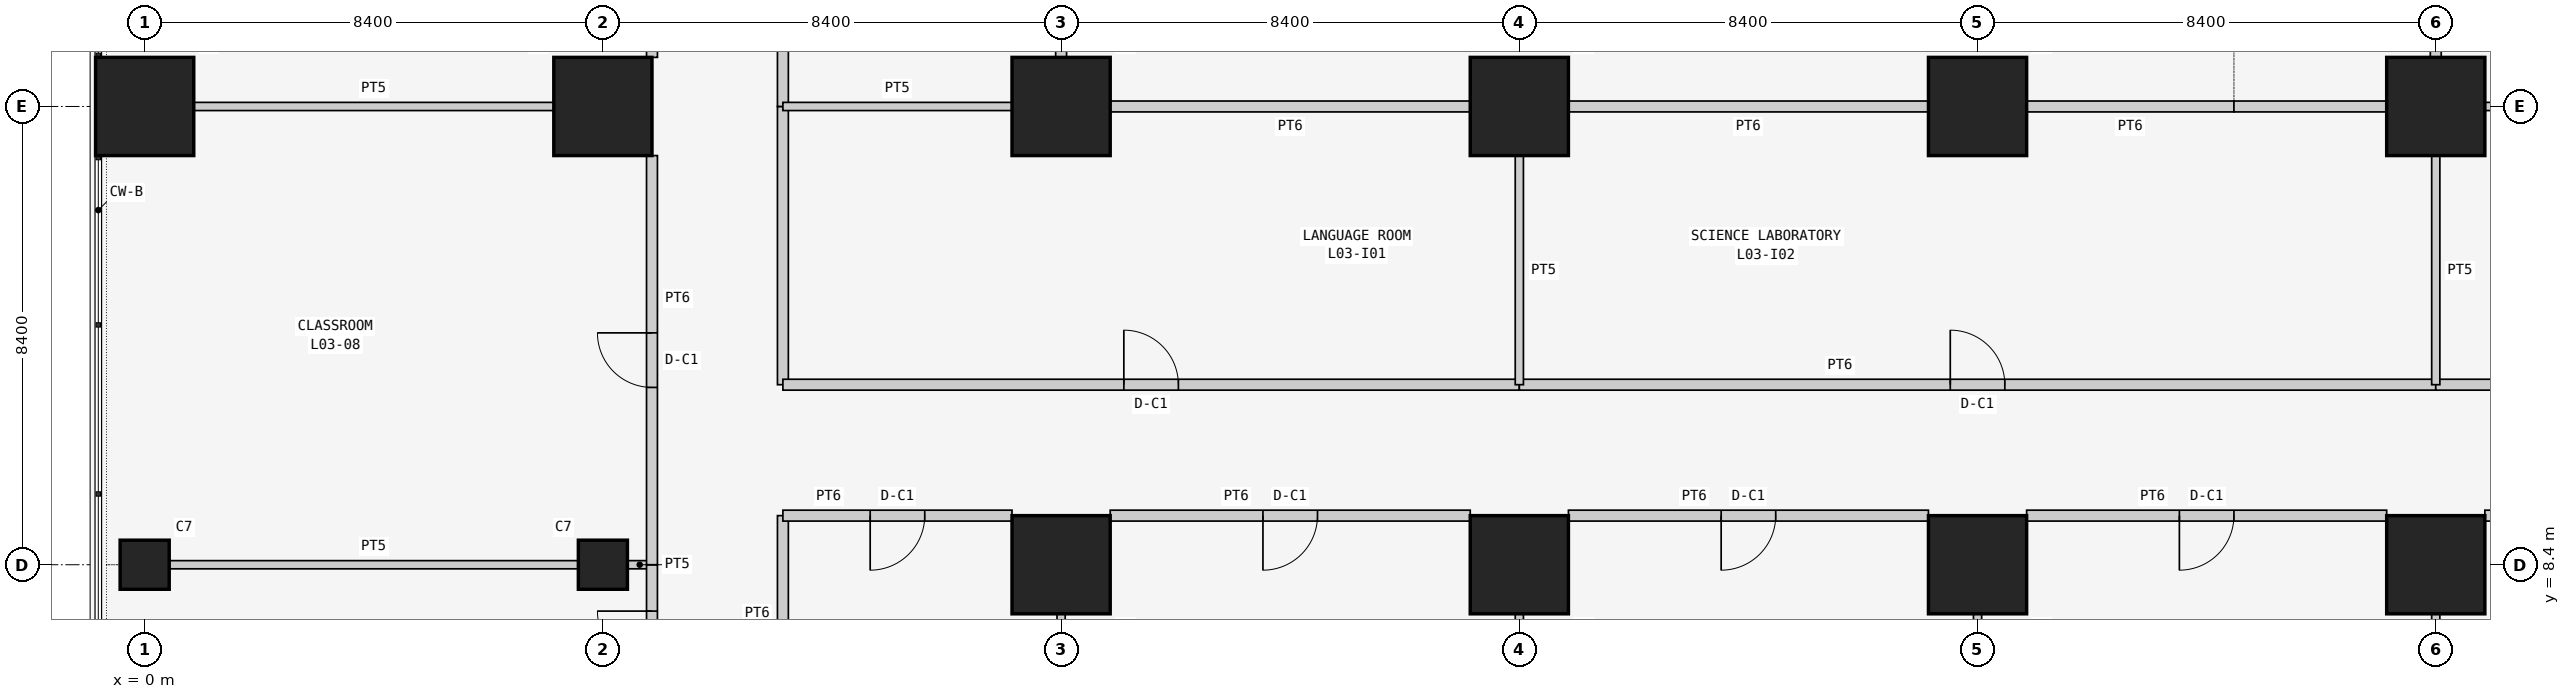
"""IFC4 building model, lengths in metres.
Left out: names, types, materials, properties, quantities, classifications, styles, units other than length and angle.
Written with IfcOpenShell. Run it as: python <this file> out.ifc"""

import sys

from ifc_helpers import new_model, si_unit, direction, frame, frame_2d, origin, origin_2d, place, context, subcontext, project, spatial, rectangle, extrude, element, fill, save


model = new_model("IFC4")
c1 = context("Model", 3, precision=1e-05, world=origin(), true_north=direction((0.0, 1.0)))
c2 = subcontext(c1, "Body", "Model", "MODEL_VIEW")
j1 = project(units=[si_unit("LENGTHUNIT", "METRE"), si_unit("PLANEANGLEUNIT", "RADIAN")], contexts=[c1])
p1 = place(None, origin())
s1 = spatial("IfcSite", under=j1, at=p1, CompositionType="ELEMENT")
p2 = place(p1, origin())
s2 = spatial("IfcBuilding", under=s1, at=p2, CompositionType="ELEMENT")
p3 = place(p2, frame((0.0, 0.0, 15.0)))
s3 = spatial("IfcBuildingStorey", under=s2, at=p3, CompositionType="ELEMENT", Elevation=15.0)
p4 = place(p3, frame((0.0, 8.4, 0.0), z_axis=(0.0, 0.0, 1.0), x_axis=(1.0, 0.0, 0.0)))
e1 = element("IfcColumn", 1, at=p4, inside=s3, PredefinedType="COLUMN", context=c2, shape_type="SweptSolid", body=[
    extrude(rectangle(XDim=0.9, YDim=0.9, at=origin_2d()), origin(), (0.0, 0.0, 1.0), 4.5),
])
p5 = place(p3, frame((0.0, 16.8, 0.0), z_axis=(0.0, 0.0, 1.0), x_axis=(1.0, 0.0, 0.0)))
e2 = element("IfcColumn", 2, at=p5, inside=s3, PredefinedType="COLUMN", context=c2, shape_type="SweptSolid", body=[
    extrude(rectangle(XDim=1.8, YDim=1.8, at=origin_2d()), origin(), (0.0, 0.0, 1.0), 4.5),
])
p6 = place(p3, frame((8.4, 8.4, 0.0), z_axis=(0.0, 0.0, 1.0), x_axis=(1.0, 0.0, 0.0)))
e3 = element("IfcColumn", 3, at=p6, inside=s3, PredefinedType="COLUMN", context=c2, shape_type="SweptSolid", body=[
    extrude(rectangle(XDim=0.9, YDim=0.9, at=origin_2d()), origin(), (0.0, 0.0, 1.0), 4.5),
])
for number, where, z_axis, x_axis in (
    (4, (8.4, 16.8, 0.0), (0.0, 0.0, 1.0), (1.0, 0.0, 0.0)),
    (5, (16.8, 8.4, 0.0), (0.0, 0.0, 1.0), (1.0, 0.0, 0.0)),
    (6, (16.8, 16.8, 0.0), (0.0, 0.0, 1.0), (1.0, 0.0, 0.0)),
    (7, (25.2, 8.4, 0.0), (0.0, 0.0, 1.0), (1.0, 0.0, 0.0)),
    (8, (25.2, 16.8, 0.0), (0.0, 0.0, 1.0), (1.0, 0.0, 0.0)),
    (9, (33.6, 8.4, 0.0), (0.0, 0.0, 1.0), (1.0, 0.0, 0.0)),
    (10, (33.6, 16.8, 0.0), (0.0, 0.0, 1.0), (1.0, 0.0, 0.0)),
    (11, (42.0, 8.4, 0.0), (0.0, 0.0, 1.0), (1.0, 0.0, 0.0)),
    (12, (42.0, 16.8, 0.0), (0.0, 0.0, 1.0), (1.0, 0.0, 0.0)),
):
    element("IfcColumn", number, at=place(p3, frame(where, z_axis=z_axis, x_axis=x_axis)), inside=s3, PredefinedType="COLUMN", context=c2, shape_type="SweptSolid", body=[
        extrude(rectangle(XDim=1.8, YDim=1.8, at=origin_2d()), origin(), (0.0, 0.0, 1.0), 4.5),
    ])
p7 = place(p3, frame((16.8, 7.5, 0.0), z_axis=(0.0, 0.0, 1.0), x_axis=(0.0, -1.0, 0.0)))
e13 = element("IfcWall", 13, at=p7, inside=s3, PredefinedType="PARTITIONING", context=c2, shape_type="SweptSolid", body=[
    extrude(rectangle(XDim=6.6, YDim=0.15, at=frame_2d((3.3, 0.0))), origin(), (0.0, 0.0, 1.0), 3.543),
])
p8 = place(p3, frame((11.7, 5.7, 0.0), z_axis=(0.0, 0.0, 1.0), x_axis=(0.0, 1.0, 0.0)))
e14 = element("IfcWall", 14, at=p8, inside=s3, PredefinedType="PARTITIONING", context=c2, shape_type="SweptSolid", body=[
    extrude(rectangle(XDim=3.6, YDim=0.2, at=frame_2d((1.8, 0.0))), origin(), (0.0, 0.0, 1.0), 4.3),
])
p9 = place(p3, frame((11.7, 9.3, 0.0), z_axis=(0.0, 0.0, 1.0), x_axis=(1.0, 0.0, 0.0)))
e15 = element("IfcWall", 15, at=p9, inside=s3, PredefinedType="PARTITIONING", context=c2, shape_type="SweptSolid", body=[
    extrude(rectangle(XDim=4.2, YDim=0.2, at=frame_2d((2.1, 0.0))), origin(), (0.0, 0.0, 1.0), 4.3),
])
p10 = place(p9, frame((1.6, 0.0, 0.0)))
e16 = element("IfcOpeningElement", 16, at=p10, cuts=e15, PredefinedType="OPENING", context=c2, shape_type="SweptSolid", body=[
    extrude(rectangle(XDim=1.0, YDim=2.1, at=frame_2d((0.5, 1.05))), frame((0.0, 0.11, 0.0), z_axis=(0.0, -1.0, 0.0), x_axis=(1.0, 0.0, 0.0)), (0.0, 0.0, 1.0), 0.22),
])
p11 = place(p3, frame((42.0, 0.9, 0.0), z_axis=(0.0, 0.0, 1.0), x_axis=(0.0, 1.0, 0.0)))
e17 = element("IfcWall", 17, at=p11, inside=s3, PredefinedType="PARTITIONING", context=c2, shape_type="SweptSolid", body=[
    extrude(rectangle(XDim=6.6, YDim=0.15, at=frame_2d((3.3, 0.0))), origin(), (0.0, 0.0, 1.0), 3.543),
])
p12 = place(p3, frame((42.9, 9.3, 0.0), z_axis=(0.0, 0.0, 1.0), x_axis=(1.0, 0.0, 0.0)))
e18 = element("IfcWall", 18, at=p12, inside=s3, PredefinedType="PARTITIONING", context=c2, shape_type="SweptSolid", body=[
    extrude(rectangle(XDim=4.2, YDim=0.2, at=frame_2d((2.1, 0.0))), origin(), (0.0, 0.0, 1.0), 4.3),
])
p13 = place(p12, frame((1.6, 0.0, 0.0)))
e19 = element("IfcOpeningElement", 19, at=p13, cuts=e18, PredefinedType="OPENING", context=c2, shape_type="SweptSolid", body=[
    extrude(rectangle(XDim=1.0, YDim=2.1, at=frame_2d((0.5, 1.05))), frame((0.0, 0.11, 0.0), z_axis=(0.0, -1.0, 0.0), x_axis=(1.0, 0.0, 0.0)), (0.0, 0.0, 1.0), 0.22),
])
p14 = place(p3, frame((0.45, 8.4, 0.0), z_axis=(0.0, 0.0, 1.0), x_axis=(1.0, 0.0, 0.0)))
e20 = element("IfcWall", 20, at=p14, inside=s3, PredefinedType="PARTITIONING", context=c2, shape_type="SweptSolid", body=[
    extrude(rectangle(XDim=7.5, YDim=0.15, at=frame_2d((3.75, 0.0))), origin(), (0.0, 0.0, 1.0), 3.543),
])
p15 = place(p3, frame((8.85, 8.4, 0.0), z_axis=(0.0, 0.0, 1.0), x_axis=(1.0, 0.0, 0.0)))
e21 = element("IfcWall", 21, at=p15, inside=s3, PredefinedType="PARTITIONING", context=c2, shape_type="SweptSolid", body=[
    extrude(rectangle(XDim=0.45, YDim=0.15, at=frame_2d((0.225, 0.0))), origin(), (0.0, 0.0, 1.0), 3.543),
])
p16 = place(p3, frame((9.3, 8.4, 0.0), z_axis=(0.0, 0.0, 1.0), x_axis=(0.0, -1.0, 0.0)))
e22 = element("IfcWall", 22, at=p16, inside=s3, PredefinedType="PARTITIONING", context=c2, shape_type="SweptSolid", body=[
    extrude(rectangle(XDim=2.7, YDim=0.2, at=frame_2d((1.35, 0.0))), origin(), (0.0, 0.0, 1.0), 4.3),
])
p17 = place(p16, frame((0.85, 0.0, 0.0)))
e23 = element("IfcOpeningElement", 23, at=p17, cuts=e22, PredefinedType="OPENING", context=c2, shape_type="SweptSolid", body=[
    extrude(rectangle(XDim=1.0, YDim=2.1, at=frame_2d((0.5, 1.05))), frame((0.0, 0.11, 0.0), z_axis=(0.0, -1.0, 0.0), x_axis=(1.0, 0.0, 0.0)), (0.0, 0.0, 1.0), 0.22),
])
p18 = place(p3, frame((25.2, 7.5, 0.0), z_axis=(0.0, 0.0, 1.0), x_axis=(0.0, -1.0, 0.0)))
e24 = element("IfcWall", 24, at=p18, inside=s3, PredefinedType="PARTITIONING", context=c2, shape_type="SweptSolid", body=[
    extrude(rectangle(XDim=6.6, YDim=0.15, at=frame_2d((3.3, 0.0))), origin(), (0.0, 0.0, 1.0), 3.543),
])
p19 = place(p3, frame((17.7, 9.3, 0.0), z_axis=(0.0, 0.0, 1.0), x_axis=(1.0, 0.0, 0.0)))
e25 = element("IfcWall", 25, at=p19, inside=s3, PredefinedType="PARTITIONING", context=c2, shape_type="SweptSolid", body=[
    extrude(rectangle(XDim=6.6, YDim=0.2, at=frame_2d((3.3, 0.0))), origin(), (0.0, 0.0, 1.0), 4.3),
])
p20 = place(p19, frame((2.8, 0.0, 0.0)))
e26 = element("IfcOpeningElement", 26, at=p20, cuts=e25, PredefinedType="OPENING", context=c2, shape_type="SweptSolid", body=[
    extrude(rectangle(XDim=1.0, YDim=2.1, at=frame_2d((0.5, 1.05))), frame((0.0, 0.11, 0.0), z_axis=(0.0, -1.0, 0.0), x_axis=(1.0, 0.0, 0.0)), (0.0, 0.0, 1.0), 0.22),
])
p21 = place(p3, frame((33.6, 7.5, 0.0), z_axis=(0.0, 0.0, 1.0), x_axis=(0.0, -1.0, 0.0)))
e27 = element("IfcWall", 27, at=p21, inside=s3, PredefinedType="PARTITIONING", context=c2, shape_type="SweptSolid", body=[
    extrude(rectangle(XDim=6.6, YDim=0.15, at=frame_2d((3.3, 0.0))), origin(), (0.0, 0.0, 1.0), 3.543),
])
p22 = place(p3, frame((26.1, 9.3, 0.0), z_axis=(0.0, 0.0, 1.0), x_axis=(1.0, 0.0, 0.0)))
e28 = element("IfcWall", 28, at=p22, inside=s3, PredefinedType="PARTITIONING", context=c2, shape_type="SweptSolid", body=[
    extrude(rectangle(XDim=6.6, YDim=0.2, at=frame_2d((3.3, 0.0))), origin(), (0.0, 0.0, 1.0), 4.3),
])
p23 = place(p22, frame((2.8, 0.0, 0.0)))
e29 = element("IfcOpeningElement", 29, at=p23, cuts=e28, PredefinedType="OPENING", context=c2, shape_type="SweptSolid", body=[
    extrude(rectangle(XDim=1.0, YDim=2.1, at=frame_2d((0.5, 1.05))), frame((0.0, 0.11, 0.0), z_axis=(0.0, -1.0, 0.0), x_axis=(1.0, 0.0, 0.0)), (0.0, 0.0, 1.0), 0.22),
])
p24 = place(p3, frame((34.5, 9.3, 0.0), z_axis=(0.0, 0.0, 1.0), x_axis=(1.0, 0.0, 0.0)))
e30 = element("IfcWall", 30, at=p24, inside=s3, PredefinedType="PARTITIONING", context=c2, shape_type="SweptSolid", body=[
    extrude(rectangle(XDim=6.6, YDim=0.2, at=frame_2d((3.3, 0.0))), origin(), (0.0, 0.0, 1.0), 4.3),
])
p25 = place(p24, frame((2.8, 0.0, 0.0)))
e31 = element("IfcOpeningElement", 31, at=p25, cuts=e30, PredefinedType="OPENING", context=c2, shape_type="SweptSolid", body=[
    extrude(rectangle(XDim=1.0, YDim=2.1, at=frame_2d((0.5, 1.05))), frame((0.0, 0.11, 0.0), z_axis=(0.0, -1.0, 0.0), x_axis=(1.0, 0.0, 0.0)), (0.0, 0.0, 1.0), 0.22),
])
p26 = place(p3, frame((0.9, 16.8, 0.0), z_axis=(0.0, 0.0, 1.0), x_axis=(1.0, 0.0, 0.0)))
e32 = element("IfcWall", 32, at=p26, inside=s3, PredefinedType="PARTITIONING", context=c2, shape_type="SweptSolid", body=[
    extrude(rectangle(XDim=6.6, YDim=0.15, at=frame_2d((3.3, 0.0))), origin(), (0.0, 0.0, 1.0), 3.543),
])
p27 = place(p3, frame((9.3, 15.9, 0.0), z_axis=(0.0, 0.0, 1.0), x_axis=(0.0, -1.0, 0.0)))
e33 = element("IfcWall", 33, at=p27, inside=s3, PredefinedType="PARTITIONING", context=c2, shape_type="SweptSolid", body=[
    extrude(rectangle(XDim=7.5, YDim=0.2, at=frame_2d((3.75, 0.0))), origin(), (0.0, 0.0, 1.0), 4.3),
])
p28 = place(p27, frame((3.25, 0.0, 0.0)))
e34 = element("IfcOpeningElement", 34, at=p28, cuts=e33, PredefinedType="OPENING", context=c2, shape_type="SweptSolid", body=[
    extrude(rectangle(XDim=1.0, YDim=2.1, at=frame_2d((0.5, 1.05))), frame((0.0, 0.11, 0.0), z_axis=(0.0, -1.0, 0.0), x_axis=(1.0, 0.0, 0.0)), (0.0, 0.0, 1.0), 0.22),
])
p29 = place(p3, frame((9.3, 24.3, 0.0), z_axis=(0.0, 0.0, 1.0), x_axis=(0.0, -1.0, 0.0)))
e35 = element("IfcWall", 35, at=p29, inside=s3, PredefinedType="PARTITIONING", context=c2, shape_type="SweptSolid", body=[
    extrude(rectangle(XDim=6.6, YDim=0.2, at=frame_2d((3.3, 0.0))), origin(), (0.0, 0.0, 1.0), 4.3),
])
p30 = place(p29, frame((2.8, 0.0, 0.0)))
e36 = element("IfcOpeningElement", 36, at=p30, cuts=e35, PredefinedType="OPENING", context=c2, shape_type="SweptSolid", body=[
    extrude(rectangle(XDim=1.0, YDim=2.1, at=frame_2d((0.5, 1.05))), frame((0.0, 0.11, 0.0), z_axis=(0.0, -1.0, 0.0), x_axis=(1.0, 0.0, 0.0)), (0.0, 0.0, 1.0), 0.22),
])
p31 = place(p3, frame((11.7, 16.8, 0.0), z_axis=(0.0, 0.0, 1.0), x_axis=(0.0, -1.0, 0.0)))
e37 = element("IfcWall", 37, at=p31, inside=s3, PredefinedType="PARTITIONING", context=c2, shape_type="SweptSolid", body=[
    extrude(rectangle(XDim=5.1, YDim=0.2, at=frame_2d((2.55, 0.0))), origin(), (0.0, 0.0, 1.0), 4.3),
])
p32 = place(p3, frame((11.7, 11.7, 0.0), z_axis=(0.0, 0.0, 1.0), x_axis=(1.0, 0.0, 0.0)))
e38 = element("IfcWall", 38, at=p32, inside=s3, PredefinedType="PARTITIONING", context=c2, shape_type="SweptSolid", body=[
    extrude(rectangle(XDim=13.5, YDim=0.2, at=frame_2d((6.75, 0.0))), origin(), (0.0, 0.0, 1.0), 4.3),
])
p33 = place(p32, frame((6.25, 0.0, 0.0)))
e39 = element("IfcOpeningElement", 39, at=p33, cuts=e38, PredefinedType="OPENING", context=c2, shape_type="SweptSolid", body=[
    extrude(rectangle(XDim=1.0, YDim=2.1, at=frame_2d((0.5, 1.05))), frame((0.0, 0.11, 0.0), z_axis=(0.0, -1.0, 0.0), x_axis=(1.0, 0.0, 0.0)), (0.0, 0.0, 1.0), 0.22),
])
p34 = place(p3, frame((25.2, 11.7, 0.0), z_axis=(0.0, 0.0, 1.0), x_axis=(1.0, 0.0, 0.0)))
e40 = element("IfcWall", 40, at=p34, inside=s3, PredefinedType="PARTITIONING", context=c2, shape_type="SweptSolid", body=[
    extrude(rectangle(XDim=16.8, YDim=0.2, at=frame_2d((8.4, 0.0))), origin(), (0.0, 0.0, 1.0), 4.3),
])
p35 = place(p34, frame((7.9, 0.0, 0.0)))
e41 = element("IfcOpeningElement", 41, at=p35, cuts=e40, PredefinedType="OPENING", context=c2, shape_type="SweptSolid", body=[
    extrude(rectangle(XDim=1.0, YDim=2.1, at=frame_2d((0.5, 1.05))), frame((0.0, 0.11, 0.0), z_axis=(0.0, -1.0, 0.0), x_axis=(1.0, 0.0, 0.0)), (0.0, 0.0, 1.0), 0.22),
])
p36 = place(p3, frame((42.0, 11.7, 0.0), z_axis=(0.0, 0.0, 1.0), x_axis=(1.0, 0.0, 0.0)))
e42 = element("IfcWall", 42, at=p36, inside=s3, PredefinedType="PARTITIONING", context=c2, shape_type="SweptSolid", body=[
    extrude(rectangle(XDim=5.1, YDim=0.2, at=frame_2d((2.55, 0.0))), origin(), (0.0, 0.0, 1.0), 4.3),
])
p37 = place(p36, frame((2.05, 0.0, 0.0)))
e43 = element("IfcOpeningElement", 43, at=p37, cuts=e42, PredefinedType="OPENING", context=c2, shape_type="SweptSolid", body=[
    extrude(rectangle(XDim=1.0, YDim=2.1, at=frame_2d((0.5, 1.05))), frame((0.0, 0.11, 0.0), z_axis=(0.0, -1.0, 0.0), x_axis=(1.0, 0.0, 0.0)), (0.0, 0.0, 1.0), 0.22),
])
p38 = place(p3, frame((11.7, 25.2, 0.0), z_axis=(0.0, 0.0, 1.0), x_axis=(0.0, -1.0, 0.0)))
e44 = element("IfcWall", 44, at=p38, inside=s3, PredefinedType="PARTITIONING", context=c2, shape_type="SweptSolid", body=[
    extrude(rectangle(XDim=8.4, YDim=0.2, at=frame_2d((4.2, 0.0))), origin(), (0.0, 0.0, 1.0), 4.3),
])
p39 = place(p38, frame((3.7, 0.0, 0.0)))
e45 = element("IfcOpeningElement", 45, at=p39, cuts=e44, PredefinedType="OPENING", context=c2, shape_type="SweptSolid", body=[
    extrude(rectangle(XDim=1.0, YDim=2.1, at=frame_2d((0.5, 1.05))), frame((0.0, 0.11, 0.0), z_axis=(0.0, -1.0, 0.0), x_axis=(1.0, 0.0, 0.0)), (0.0, 0.0, 1.0), 0.22),
])
p40 = place(p3, frame((24.3, 16.8, 0.0), z_axis=(0.0, 0.0, 1.0), x_axis=(-1.0, 0.0, 0.0)))
e46 = element("IfcWall", 46, at=p40, inside=s3, PredefinedType="PARTITIONING", context=c2, shape_type="SweptSolid", body=[
    extrude(rectangle(XDim=6.6, YDim=0.2, at=frame_2d((3.3, 0.0))), origin(), (0.0, 0.0, 1.0), 3.543),
])
p41 = place(p3, frame((32.7, 16.8, 0.0), z_axis=(0.0, 0.0, 1.0), x_axis=(-1.0, 0.0, 0.0)))
e47 = element("IfcWall", 47, at=p41, inside=s3, PredefinedType="PARTITIONING", context=c2, shape_type="SweptSolid", body=[
    extrude(rectangle(XDim=6.6, YDim=0.2, at=frame_2d((3.3, 0.0))), origin(), (0.0, 0.0, 1.0), 3.543),
])
p42 = place(p3, frame((38.3, 16.8, 0.0), z_axis=(0.0, 0.0, 1.0), x_axis=(-1.0, 0.0, 0.0)))
e48 = element("IfcWall", 48, at=p42, inside=s3, PredefinedType="PARTITIONING", context=c2, shape_type="SweptSolid", body=[
    extrude(rectangle(XDim=3.8, YDim=0.2, at=frame_2d((1.9, 0.0))), origin(), (0.0, 0.0, 1.0), 3.543),
])
p43 = place(p3, frame((16.8, 17.7, 0.0), z_axis=(0.0, 0.0, 1.0), x_axis=(0.0, 1.0, 0.0)))
e49 = element("IfcWall", 49, at=p43, inside=s3, PredefinedType="PARTITIONING", context=c2, shape_type="SweptSolid", body=[
    extrude(rectangle(XDim=6.6, YDim=0.2, at=frame_2d((3.3, 0.0))), origin(), (0.0, 0.0, 1.0), 3.543),
])
p44 = place(p3, frame((41.1, 16.8, 0.0), z_axis=(0.0, 0.0, 1.0), x_axis=(-1.0, 0.0, 0.0)))
e50 = element("IfcWall", 50, at=p44, inside=s3, PredefinedType="PARTITIONING", context=c2, shape_type="SweptSolid", body=[
    extrude(rectangle(XDim=2.8, YDim=0.2, at=frame_2d((1.4, 0.0))), origin(), (0.0, 0.0, 1.0), 3.543),
])
p45 = place(p3, frame((42.0, 24.3, 0.0), z_axis=(0.0, 0.0, 1.0), x_axis=(0.0, -1.0, 0.0)))
e51 = element("IfcWall", 51, at=p45, inside=s3, PredefinedType="PARTITIONING", context=c2, shape_type="SweptSolid", body=[
    extrude(rectangle(XDim=6.6, YDim=0.2, at=frame_2d((3.3, 0.0))), origin(), (0.0, 0.0, 1.0), 3.543),
])
for number, where, z_axis, x_axis in (
    (52, (25.2, 15.9, 0.0), (0.0, 0.0, 1.0), (0.0, -1.0, 0.0)),
    (53, (11.7, 16.8, 0.0), (0.0, 0.0, 1.0), (1.0, 0.0, 0.0)),
    (54, (42.0, 15.9, 0.0), (0.0, 0.0, 1.0), (0.0, -1.0, 0.0)),
):
    element("IfcWall", number, at=place(p3, frame(where, z_axis=z_axis, x_axis=x_axis)), inside=s3, PredefinedType="PARTITIONING", context=c2, shape_type="SweptSolid", body=[
        extrude(rectangle(XDim=4.2, YDim=0.15, at=frame_2d((2.1, 0.0))), origin(), (0.0, 0.0, 1.0), 3.543),
    ])
p46 = place(p3, frame((42.9, 16.8, 0.0), z_axis=(0.0, 0.0, 1.0), x_axis=(1.0, 0.0, 0.0)))
e55 = element("IfcWall", 55, at=p46, inside=s3, PredefinedType="PARTITIONING", context=c2, shape_type="SweptSolid", body=[
    extrude(rectangle(XDim=4.2, YDim=0.15, at=frame_2d((2.1, 0.0))), origin(), (0.0, 0.0, 1.0), 3.543),
])
p47 = place(p10, frame((1.0, 0.0, 0.0), z_axis=(0.0, 0.0, 1.0), x_axis=(-1.0, 0.0, 0.0)))
e56 = element("IfcDoor", 56, at=p47, inside=s3, OperationType="SINGLE_SWING_RIGHT", PredefinedType="DOOR", context=c2, shape_type="SweptSolid", body=[
    extrude(rectangle(XDim=1.0, YDim=2.1, at=frame_2d((0.5, 1.05))), frame((0.0, 0.025, 0.0), z_axis=(0.0, -1.0, 0.0), x_axis=(1.0, 0.0, 0.0)), (0.0, 0.0, 1.0), 0.05),
])
fill(e16, e56)
p48 = place(p17, frame((1.0, 0.0, 0.0), z_axis=(0.0, 0.0, 1.0), x_axis=(-1.0, 0.0, 0.0)))
e57 = element("IfcDoor", 57, at=p48, inside=s3, OperationType="SINGLE_SWING_RIGHT", PredefinedType="DOOR", context=c2, shape_type="SweptSolid", body=[
    extrude(rectangle(XDim=1.0, YDim=2.1, at=frame_2d((0.5, 1.05))), frame((0.0, 0.025, 0.0), z_axis=(0.0, -1.0, 0.0), x_axis=(1.0, 0.0, 0.0)), (0.0, 0.0, 1.0), 0.05),
])
fill(e23, e57)
p49 = place(p20, frame((1.0, 0.0, 0.0), z_axis=(0.0, 0.0, 1.0), x_axis=(-1.0, 0.0, 0.0)))
e58 = element("IfcDoor", 58, at=p49, inside=s3, OperationType="SINGLE_SWING_RIGHT", PredefinedType="DOOR", context=c2, shape_type="SweptSolid", body=[
    extrude(rectangle(XDim=1.0, YDim=2.1, at=frame_2d((0.5, 1.05))), frame((0.0, 0.025, 0.0), z_axis=(0.0, -1.0, 0.0), x_axis=(1.0, 0.0, 0.0)), (0.0, 0.0, 1.0), 0.05),
])
fill(e26, e58)
p50 = place(p23, frame((1.0, 0.0, 0.0), z_axis=(0.0, 0.0, 1.0), x_axis=(-1.0, 0.0, 0.0)))
e59 = element("IfcDoor", 59, at=p50, inside=s3, OperationType="SINGLE_SWING_RIGHT", PredefinedType="DOOR", context=c2, shape_type="SweptSolid", body=[
    extrude(rectangle(XDim=1.0, YDim=2.1, at=frame_2d((0.5, 1.05))), frame((0.0, 0.025, 0.0), z_axis=(0.0, -1.0, 0.0), x_axis=(1.0, 0.0, 0.0)), (0.0, 0.0, 1.0), 0.05),
])
fill(e29, e59)
p51 = place(p25, frame((1.0, 0.0, 0.0), z_axis=(0.0, 0.0, 1.0), x_axis=(-1.0, 0.0, 0.0)))
e60 = element("IfcDoor", 60, at=p51, inside=s3, OperationType="SINGLE_SWING_RIGHT", PredefinedType="DOOR", context=c2, shape_type="SweptSolid", body=[
    extrude(rectangle(XDim=1.0, YDim=2.1, at=frame_2d((0.5, 1.05))), frame((0.0, 0.025, 0.0), z_axis=(0.0, -1.0, 0.0), x_axis=(1.0, 0.0, 0.0)), (0.0, 0.0, 1.0), 0.05),
])
fill(e31, e60)
p52 = place(p28, frame((1.0, 0.0, 0.0), z_axis=(0.0, 0.0, 1.0), x_axis=(-1.0, 0.0, 0.0)))
e61 = element("IfcDoor", 61, at=p52, inside=s3, OperationType="SINGLE_SWING_RIGHT", PredefinedType="DOOR", context=c2, shape_type="SweptSolid", body=[
    extrude(rectangle(XDim=1.0, YDim=2.1, at=frame_2d((0.5, 1.05))), frame((0.0, 0.025, 0.0), z_axis=(0.0, -1.0, 0.0), x_axis=(1.0, 0.0, 0.0)), (0.0, 0.0, 1.0), 0.05),
])
fill(e34, e61)
p53 = place(p33, origin())
e62 = element("IfcDoor", 62, at=p53, inside=s3, OperationType="SINGLE_SWING_LEFT", PredefinedType="DOOR", context=c2, shape_type="SweptSolid", body=[
    extrude(rectangle(XDim=1.0, YDim=2.1, at=frame_2d((0.5, 1.05))), frame((0.0, 0.025, 0.0), z_axis=(0.0, -1.0, 0.0), x_axis=(1.0, 0.0, 0.0)), (0.0, 0.0, 1.0), 0.05),
])
fill(e39, e62)
p54 = place(p35, origin())
e63 = element("IfcDoor", 63, at=p54, inside=s3, OperationType="SINGLE_SWING_LEFT", PredefinedType="DOOR", context=c2, shape_type="SweptSolid", body=[
    extrude(rectangle(XDim=1.0, YDim=2.1, at=frame_2d((0.5, 1.05))), frame((0.0, 0.025, 0.0), z_axis=(0.0, -1.0, 0.0), x_axis=(1.0, 0.0, 0.0)), (0.0, 0.0, 1.0), 0.05),
])
fill(e41, e63)
save(model, sys.argv[1])
